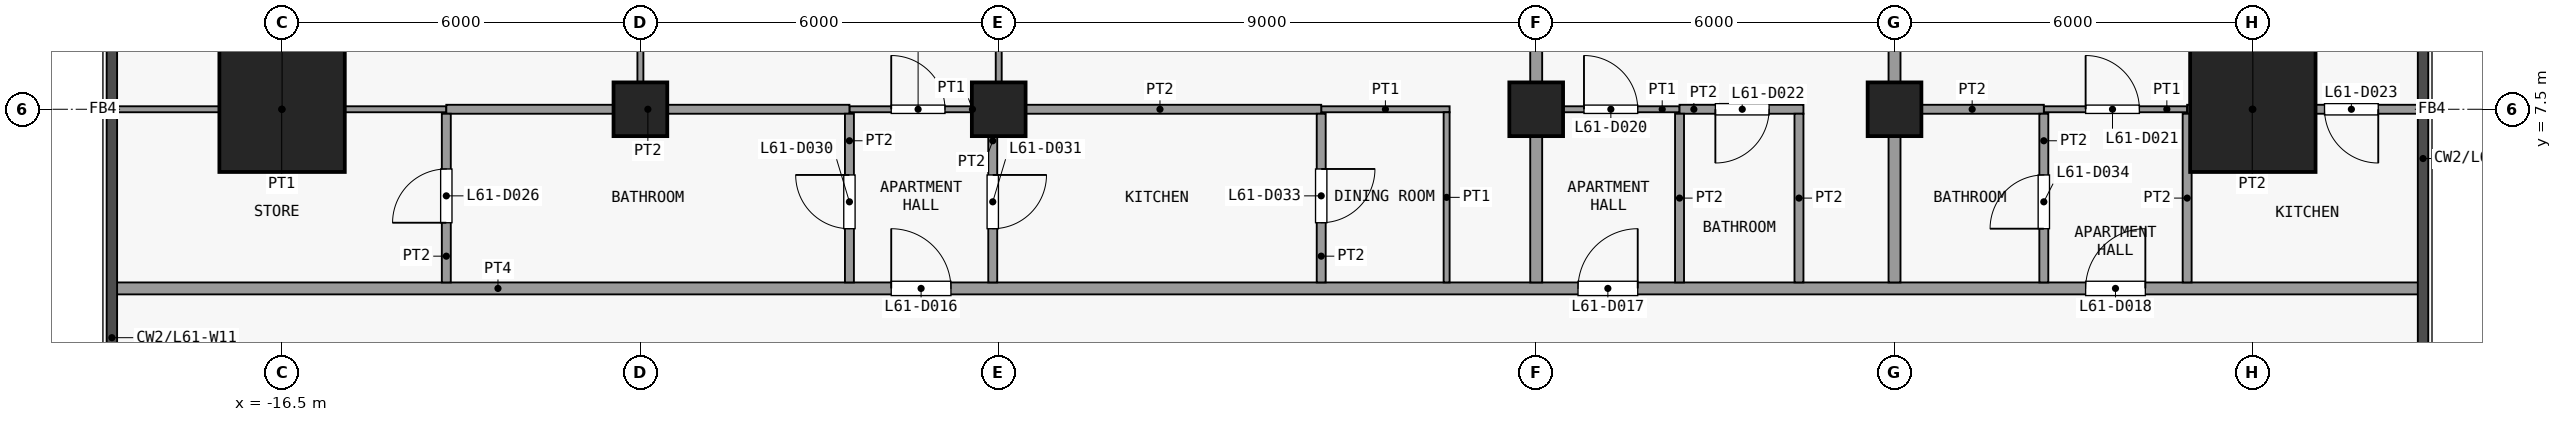
"""IFC4 building model, lengths in metres.
Left out: names, types, materials, properties, quantities, classifications, styles, units other than length and angle.
Written with IfcOpenShell. Run it as: python <this file> out.ifc"""

import sys

from ifc_helpers import new_model, si_unit, direction, frame, frame_2d, origin, origin_2d, place, context, subcontext, project, spatial, rectangle, extrude, element, fill, save


model = new_model("IFC4")
c1 = context("Model", 3, precision=1e-05, world=origin(), true_north=direction((0.0, 1.0)))
c2 = subcontext(c1, "Body", "Model", "MODEL_VIEW")
j1 = project(units=[si_unit("LENGTHUNIT", "METRE"), si_unit("PLANEANGLEUNIT", "RADIAN")], contexts=[c1])
p1 = place(None, origin())
s1 = spatial("IfcSite", under=j1, at=p1, CompositionType="ELEMENT")
p2 = place(p1, origin())
s2 = spatial("IfcBuilding", under=s1, at=p2, CompositionType="ELEMENT")
p3 = place(p2, frame((0.0, 0.0, 241.1)))
s3 = spatial("IfcBuildingStorey", under=s2, at=p3, CompositionType="ELEMENT", Elevation=241.1)
p4 = place(p3, frame((-16.5, 7.5, 0.0), z_axis=(0.0, 0.0, 1.0), x_axis=(1.0, 0.0, 0.0)))
e1 = element("IfcColumn", 1, at=p4, inside=s3, PredefinedType="COLUMN", context=c2, shape_type="SweptSolid", body=[
    extrude(rectangle(XDim=2.1, YDim=2.1, at=origin_2d()), origin(), (0.0, 0.0, 1.0), 3.6),
])
for number, where, z_axis, x_axis in (
    (2, (-10.5, 7.5, 0.0), (0.0, 0.0, 1.0), (1.0, 0.0, 0.0)),
    (3, (-4.5, 7.5, 0.0), (0.0, 0.0, 1.0), (1.0, 0.0, 0.0)),
    (4, (4.5, 7.5, 0.0), (0.0, 0.0, 1.0), (1.0, 0.0, 0.0)),
    (5, (10.5, 7.5, 0.0), (0.0, 0.0, 1.0), (1.0, 0.0, 0.0)),
):
    element("IfcColumn", number, at=place(p3, frame(where, z_axis=z_axis, x_axis=x_axis)), inside=s3, PredefinedType="COLUMN", context=c2, shape_type="SweptSolid", body=[
        extrude(rectangle(XDim=0.9, YDim=0.9, at=origin_2d()), origin(), (0.0, 0.0, 1.0), 3.6),
    ])
p5 = place(p3, frame((16.5, 7.5, 0.0), z_axis=(0.0, 0.0, 1.0), x_axis=(1.0, 0.0, 0.0)))
e6 = element("IfcColumn", 6, at=p5, inside=s3, PredefinedType="COLUMN", context=c2, shape_type="SweptSolid", body=[
    extrude(rectangle(XDim=2.1, YDim=2.1, at=origin_2d()), origin(), (0.0, 0.0, 1.0), 3.6),
])
p6 = place(p3, frame((-19.35, 4.5, 0.0), z_axis=(0.0, 0.0, 1.0), x_axis=(1.0, 0.0, 0.0)))
e7 = element("IfcWall", 7, at=p6, inside=s3, PredefinedType="PARTITIONING", context=c2, shape_type="SweptSolid", body=[
    extrude(rectangle(XDim=38.7, YDim=0.2, at=frame_2d((19.35, 0.0))), origin(), (0.0, 0.0, 1.0), 3.3),
])
p7 = place(p6, frame((13.05, 0.0, 0.0)))
e8 = element("IfcOpeningElement", 8, at=p7, cuts=e7, PredefinedType="OPENING", context=c2, shape_type="SweptSolid", body=[
    extrude(rectangle(XDim=1.0, YDim=2.1, at=frame_2d((0.5, 1.05))), frame((0.0, 0.11, 0.0), z_axis=(0.0, -1.0, 0.0), x_axis=(1.0, 0.0, 0.0)), (0.0, 0.0, 1.0), 0.22),
])
p8 = place(p6, frame((24.55, 0.0, 0.0)))
e9 = element("IfcOpeningElement", 9, at=p8, cuts=e7, PredefinedType="OPENING", context=c2, shape_type="SweptSolid", body=[
    extrude(rectangle(XDim=1.0, YDim=2.1, at=frame_2d((0.5, 1.05))), frame((0.0, 0.11, 0.0), z_axis=(0.0, -1.0, 0.0), x_axis=(1.0, 0.0, 0.0)), (0.0, 0.0, 1.0), 0.22),
])
p9 = place(p6, frame((33.05, 0.0, 0.0)))
e10 = element("IfcOpeningElement", 10, at=p9, cuts=e7, PredefinedType="OPENING", context=c2, shape_type="SweptSolid", body=[
    extrude(rectangle(XDim=1.0, YDim=2.1, at=frame_2d((0.5, 1.05))), frame((0.0, 0.11, 0.0), z_axis=(0.0, -1.0, 0.0), x_axis=(1.0, 0.0, 0.0)), (0.0, 0.0, 1.0), 0.22),
])
p10 = place(p3, frame((-19.262, 7.5, 0.0), z_axis=(0.0, 0.0, 1.0), x_axis=(1.0, 0.0, 0.0)))
e11 = element("IfcWall", 11, at=p10, inside=s3, PredefinedType="PARTITIONING", context=c2, shape_type="SweptSolid", body=[
    extrude(rectangle(XDim=5.512, YDim=0.1, at=frame_2d((2.756, 0.0))), origin(), (0.0, 0.0, 1.0), 3.3),
])
p11 = place(p3, frame((-7.0, 7.5, 0.0), z_axis=(0.0, 0.0, 1.0), x_axis=(1.0, 0.0, 0.0)))
e12 = element("IfcWall", 12, at=p11, inside=s3, PredefinedType="PARTITIONING", context=c2, shape_type="SweptSolid", body=[
    extrude(rectangle(XDim=2.4, YDim=0.1, at=frame_2d((1.2, 0.0))), origin(), (0.0, 0.0, 1.0), 3.3),
])
p12 = place(p11, frame((0.7, 0.0, 0.0)))
e13 = element("IfcOpeningElement", 13, at=p12, cuts=e12, PredefinedType="OPENING", context=c2, shape_type="SweptSolid", body=[
    extrude(rectangle(XDim=0.9, YDim=2.1, at=frame_2d((0.45, 1.05))), frame((0.0, 0.06, 0.0), z_axis=(0.0, -1.0, 0.0), x_axis=(1.0, 0.0, 0.0)), (0.0, 0.0, 1.0), 0.12),
])
p13 = place(p3, frame((0.9, 7.5, 0.0), z_axis=(0.0, 0.0, 1.0), x_axis=(1.0, 0.0, 0.0)))
e14 = element("IfcWall", 14, at=p13, inside=s3, PredefinedType="PARTITIONING", context=c2, shape_type="SweptSolid", body=[
    extrude(rectangle(XDim=2.15, YDim=0.1, at=frame_2d((1.075, 0.0))), origin(), (0.0, 0.0, 1.0), 3.3),
])
p14 = place(p3, frame((4.6, 7.5, 0.0), z_axis=(0.0, 0.0, 1.0), x_axis=(1.0, 0.0, 0.0)))
e15 = element("IfcWall", 15, at=p14, inside=s3, PredefinedType="PARTITIONING", context=c2, shape_type="SweptSolid", body=[
    extrude(rectangle(XDim=2.3, YDim=0.1, at=frame_2d((1.15, 0.0))), origin(), (0.0, 0.0, 1.0), 3.3),
])
p15 = place(p14, frame((0.7, 0.0, 0.0)))
e16 = element("IfcOpeningElement", 16, at=p15, cuts=e15, PredefinedType="OPENING", context=c2, shape_type="SweptSolid", body=[
    extrude(rectangle(XDim=0.9, YDim=2.1, at=frame_2d((0.45, 1.05))), frame((0.0, 0.06, 0.0), z_axis=(0.0, -1.0, 0.0), x_axis=(1.0, 0.0, 0.0)), (0.0, 0.0, 1.0), 0.12),
])
p16 = place(p3, frame((13.0, 7.5, 0.0), z_axis=(0.0, 0.0, 1.0), x_axis=(1.0, 0.0, 0.0)))
e17 = element("IfcWall", 17, at=p16, inside=s3, PredefinedType="PARTITIONING", context=c2, shape_type="SweptSolid", body=[
    extrude(rectangle(XDim=2.4, YDim=0.1, at=frame_2d((1.2, 0.0))), origin(), (0.0, 0.0, 1.0), 3.3),
])
p17 = place(p16, frame((0.7, 0.0, 0.0)))
e18 = element("IfcOpeningElement", 18, at=p17, cuts=e17, PredefinedType="OPENING", context=c2, shape_type="SweptSolid", body=[
    extrude(rectangle(XDim=0.9, YDim=2.1, at=frame_2d((0.45, 1.05))), frame((0.0, 0.06, 0.0), z_axis=(0.0, -1.0, 0.0), x_axis=(1.0, 0.0, 0.0)), (0.0, 0.0, 1.0), 0.12),
])
p18 = place(p3, frame((-13.75, 7.5, 0.0), z_axis=(0.0, 0.0, 1.0), x_axis=(1.0, 0.0, 0.0)))
e19 = element("IfcWall", 19, at=p18, inside=s3, PredefinedType="PARTITIONING", context=c2, shape_type="SweptSolid", body=[
    extrude(rectangle(XDim=6.75, YDim=0.15, at=frame_2d((3.375, 0.0))), origin(), (0.0, 0.0, 1.0), 3.3),
])
p19 = place(p3, frame((-4.5, 7.5, 0.0), z_axis=(0.0, 0.0, 1.0), x_axis=(1.0, 0.0, 0.0)))
e20 = element("IfcWall", 20, at=p19, inside=s3, PredefinedType="PARTITIONING", context=c2, shape_type="SweptSolid", body=[
    extrude(rectangle(XDim=5.4, YDim=0.15, at=frame_2d((2.7, 0.0))), origin(), (0.0, 0.0, 1.0), 3.3),
])
p20 = place(p3, frame((6.9, 7.5, 0.0), z_axis=(0.0, 0.0, 1.0), x_axis=(1.0, 0.0, 0.0)))
e21 = element("IfcWall", 21, at=p20, inside=s3, PredefinedType="PARTITIONING", context=c2, shape_type="SweptSolid", body=[
    extrude(rectangle(XDim=2.075, YDim=0.15, at=frame_2d((1.038, 0.0))), origin(), (0.0, 0.0, 1.0), 3.3),
])
p21 = place(p20, frame((0.6, 0.0, 0.0)))
e22 = element("IfcOpeningElement", 22, at=p21, cuts=e21, PredefinedType="OPENING", context=c2, shape_type="SweptSolid", body=[
    extrude(rectangle(XDim=0.9, YDim=2.1, at=frame_2d((0.45, 1.05))), frame((0.0, 0.085, 0.0), z_axis=(0.0, -1.0, 0.0), x_axis=(1.0, 0.0, 0.0)), (0.0, 0.0, 1.0), 0.17),
])
p22 = place(p3, frame((10.6, 7.5, 0.0), z_axis=(0.0, 0.0, 1.0), x_axis=(1.0, 0.0, 0.0)))
e23 = element("IfcWall", 23, at=p22, inside=s3, PredefinedType="PARTITIONING", context=c2, shape_type="SweptSolid", body=[
    extrude(rectangle(XDim=2.4, YDim=0.15, at=frame_2d((1.2, 0.0))), origin(), (0.0, 0.0, 1.0), 3.3),
])
p23 = place(p3, frame((15.4, 7.5, 0.0), z_axis=(0.0, 0.0, 1.0), x_axis=(1.0, 0.0, 0.0)))
e24 = element("IfcWall", 24, at=p23, inside=s3, PredefinedType="PARTITIONING", context=c2, shape_type="SweptSolid", body=[
    extrude(rectangle(XDim=3.863, YDim=0.15, at=frame_2d((1.931, 0.0))), origin(), (0.0, 0.0, 1.0), 3.3),
])
p24 = place(p23, frame((2.3, 0.0, 0.0)))
e25 = element("IfcOpeningElement", 25, at=p24, cuts=e24, PredefinedType="OPENING", context=c2, shape_type="SweptSolid", body=[
    extrude(rectangle(XDim=0.9, YDim=2.1, at=frame_2d((0.45, 1.05))), frame((0.0, 0.085, 0.0), z_axis=(0.0, -1.0, 0.0), x_axis=(1.0, 0.0, 0.0)), (0.0, 0.0, 1.0), 0.17),
])
p25 = place(p3, frame((-13.75, 4.6, 0.0), z_axis=(0.0, 0.0, 1.0), x_axis=(0.0, 1.0, 0.0)))
e26 = element("IfcWall", 26, at=p25, inside=s3, PredefinedType="PARTITIONING", context=c2, shape_type="SweptSolid", body=[
    extrude(rectangle(XDim=2.825, YDim=0.15, at=frame_2d((1.413, 0.0))), origin(), (0.0, 0.0, 1.0), 3.3),
])
p26 = place(p25, frame((1.0, 0.0, 0.0)))
e27 = element("IfcOpeningElement", 27, at=p26, cuts=e26, PredefinedType="OPENING", context=c2, shape_type="SweptSolid", body=[
    extrude(rectangle(XDim=0.9, YDim=2.1, at=frame_2d((0.45, 1.05))), frame((0.0, 0.085, 0.0), z_axis=(0.0, -1.0, 0.0), x_axis=(1.0, 0.0, 0.0)), (0.0, 0.0, 1.0), 0.17),
])
p27 = place(p3, frame((-10.5, 7.575, 0.0), z_axis=(0.0, 0.0, 1.0), x_axis=(0.0, 1.0, 0.0)))
e28 = element("IfcWall", 28, at=p27, inside=s3, PredefinedType="PARTITIONING", context=c2, shape_type="SweptSolid", body=[
    extrude(rectangle(XDim=8.688, YDim=0.1, at=frame_2d((4.344, 0.0))), origin(), (0.0, 0.0, 1.0), 3.3),
])
p28 = place(p27, frame((6.425, 0.0, 0.0)))
e29 = element("IfcOpeningElement", 29, at=p28, cuts=e28, PredefinedType="OPENING", context=c2, shape_type="SweptSolid", body=[
    extrude(rectangle(XDim=0.9, YDim=2.1, at=frame_2d((0.45, 1.05))), frame((0.0, 0.06, 0.0), z_axis=(0.0, -1.0, 0.0), x_axis=(1.0, 0.0, 0.0)), (0.0, 0.0, 1.0), 0.12),
])
p29 = place(p3, frame((-7.0, 4.6, 0.0), z_axis=(0.0, 0.0, 1.0), x_axis=(0.0, 1.0, 0.0)))
e30 = element("IfcWall", 30, at=p29, inside=s3, PredefinedType="PARTITIONING", context=c2, shape_type="SweptSolid", body=[
    extrude(rectangle(XDim=2.825, YDim=0.15, at=frame_2d((1.413, 0.0))), origin(), (0.0, 0.0, 1.0), 3.3),
])
p30 = place(p29, frame((0.9, 0.0, 0.0)))
e31 = element("IfcOpeningElement", 31, at=p30, cuts=e30, PredefinedType="OPENING", context=c2, shape_type="SweptSolid", body=[
    extrude(rectangle(XDim=0.9, YDim=2.1, at=frame_2d((0.45, 1.05))), frame((0.0, 0.085, 0.0), z_axis=(0.0, -1.0, 0.0), x_axis=(1.0, 0.0, 0.0)), (0.0, 0.0, 1.0), 0.17),
])
p31 = place(p3, frame((-4.6, 4.6, 0.0), z_axis=(0.0, 0.0, 1.0), x_axis=(0.0, 1.0, 0.0)))
e32 = element("IfcWall", 32, at=p31, inside=s3, PredefinedType="PARTITIONING", context=c2, shape_type="SweptSolid", body=[
    extrude(rectangle(XDim=2.825, YDim=0.15, at=frame_2d((1.413, 0.0))), origin(), (0.0, 0.0, 1.0), 3.3),
])
p32 = place(p31, frame((0.9, 0.0, 0.0)))
e33 = element("IfcOpeningElement", 33, at=p32, cuts=e32, PredefinedType="OPENING", context=c2, shape_type="SweptSolid", body=[
    extrude(rectangle(XDim=0.9, YDim=2.1, at=frame_2d((0.45, 1.05))), frame((0.0, 0.085, 0.0), z_axis=(0.0, -1.0, 0.0), x_axis=(1.0, 0.0, 0.0)), (0.0, 0.0, 1.0), 0.17),
])
p33 = place(p3, frame((-4.5, 7.575, 0.0), z_axis=(0.0, 0.0, 1.0), x_axis=(0.0, 1.0, 0.0)))
e34 = element("IfcWall", 34, at=p33, inside=s3, PredefinedType="PARTITIONING", context=c2, shape_type="SweptSolid", body=[
    extrude(rectangle(XDim=8.688, YDim=0.1, at=frame_2d((4.344, 0.0))), origin(), (0.0, 0.0, 1.0), 3.3),
])
p34 = place(p33, frame((6.425, 0.0, 0.0)))
e35 = element("IfcOpeningElement", 35, at=p34, cuts=e34, PredefinedType="OPENING", context=c2, shape_type="SweptSolid", body=[
    extrude(rectangle(XDim=0.9, YDim=2.1, at=frame_2d((0.45, 1.05))), frame((0.0, 0.06, 0.0), z_axis=(0.0, -1.0, 0.0), x_axis=(1.0, 0.0, 0.0)), (0.0, 0.0, 1.0), 0.12),
])
p35 = place(p3, frame((0.9, 4.6, 0.0), z_axis=(0.0, 0.0, 1.0), x_axis=(0.0, 1.0, 0.0)))
e36 = element("IfcWall", 36, at=p35, inside=s3, PredefinedType="PARTITIONING", context=c2, shape_type="SweptSolid", body=[
    extrude(rectangle(XDim=2.825, YDim=0.15, at=frame_2d((1.413, 0.0))), origin(), (0.0, 0.0, 1.0), 3.3),
])
p36 = place(p35, frame((1.0, 0.0, 0.0)))
e37 = element("IfcOpeningElement", 37, at=p36, cuts=e36, PredefinedType="OPENING", context=c2, shape_type="SweptSolid", body=[
    extrude(rectangle(XDim=0.9, YDim=2.1, at=frame_2d((0.45, 1.05))), frame((0.0, 0.085, 0.0), z_axis=(0.0, -1.0, 0.0), x_axis=(1.0, 0.0, 0.0)), (0.0, 0.0, 1.0), 0.17),
])
p37 = place(p3, frame((3.0, 4.6, 0.0), z_axis=(0.0, 0.0, 1.0), x_axis=(0.0, 1.0, 0.0)))
e38 = element("IfcWall", 38, at=p37, inside=s3, PredefinedType="PARTITIONING", context=c2, shape_type="SweptSolid", body=[
    extrude(rectangle(XDim=2.85, YDim=0.1, at=frame_2d((1.425, 0.0))), origin(), (0.0, 0.0, 1.0), 3.3),
])
p38 = place(p3, frame((4.5, 4.6, 0.0), z_axis=(0.0, 0.0, 1.0), x_axis=(0.0, 1.0, 0.0)))
e39 = element("IfcWall", 39, at=p38, inside=s3, PredefinedType="PARTITIONING", context=c2, shape_type="SweptSolid", body=[
    extrude(rectangle(XDim=10.25, YDim=0.2, at=frame_2d((5.125, 0.0))), origin(), (0.0, 0.0, 1.0), 3.3),
])
for number, where, z_axis, x_axis in (
    (40, (6.9, 4.6, 0.0), (0.0, 0.0, 1.0), (0.0, 1.0, 0.0)),
    (41, (8.9, 4.6, 0.0), (0.0, 0.0, 1.0), (0.0, 1.0, 0.0)),
):
    element("IfcWall", number, at=place(p3, frame(where, z_axis=z_axis, x_axis=x_axis)), inside=s3, PredefinedType="PARTITIONING", context=c2, shape_type="SweptSolid", body=[
        extrude(rectangle(XDim=2.825, YDim=0.15, at=frame_2d((1.413, 0.0))), origin(), (0.0, 0.0, 1.0), 3.3),
    ])
p39 = place(p3, frame((10.5, 4.6, 0.0), z_axis=(0.0, 0.0, 1.0), x_axis=(0.0, 1.0, 0.0)))
e42 = element("IfcWall", 42, at=p39, inside=s3, PredefinedType="PARTITIONING", context=c2, shape_type="SweptSolid", body=[
    extrude(rectangle(XDim=10.25, YDim=0.2, at=frame_2d((5.125, 0.0))), origin(), (0.0, 0.0, 1.0), 3.3),
])
p40 = place(p3, frame((13.0, 4.6, 0.0), z_axis=(0.0, 0.0, 1.0), x_axis=(0.0, 1.0, 0.0)))
e43 = element("IfcWall", 43, at=p40, inside=s3, PredefinedType="PARTITIONING", context=c2, shape_type="SweptSolid", body=[
    extrude(rectangle(XDim=2.825, YDim=0.15, at=frame_2d((1.413, 0.0))), origin(), (0.0, 0.0, 1.0), 3.3),
])
p41 = place(p40, frame((0.9, 0.0, 0.0)))
e44 = element("IfcOpeningElement", 44, at=p41, cuts=e43, PredefinedType="OPENING", context=c2, shape_type="SweptSolid", body=[
    extrude(rectangle(XDim=0.9, YDim=2.1, at=frame_2d((0.45, 1.05))), frame((0.0, 0.085, 0.0), z_axis=(0.0, -1.0, 0.0), x_axis=(1.0, 0.0, 0.0)), (0.0, 0.0, 1.0), 0.17),
])
p42 = place(p3, frame((15.4, 4.6, 0.0), z_axis=(0.0, 0.0, 1.0), x_axis=(0.0, 1.0, 0.0)))
e45 = element("IfcWall", 45, at=p42, inside=s3, PredefinedType="PARTITIONING", context=c2, shape_type="SweptSolid", body=[
    extrude(rectangle(XDim=2.825, YDim=0.15, at=frame_2d((1.413, 0.0))), origin(), (0.0, 0.0, 1.0), 3.3),
])
p43 = place(p7, origin())
e46 = element("IfcDoor", 46, at=p43, inside=s3, OperationType="SINGLE_SWING_RIGHT", PredefinedType="DOOR", context=c2, shape_type="SweptSolid", body=[
    extrude(rectangle(XDim=1.0, YDim=2.1, at=frame_2d((0.5, 1.05))), frame((0.0, 0.025, 0.0), z_axis=(0.0, -1.0, 0.0), x_axis=(1.0, 0.0, 0.0)), (0.0, 0.0, 1.0), 0.05),
])
fill(e8, e46)
p44 = place(p8, origin())
e47 = element("IfcDoor", 47, at=p44, inside=s3, OperationType="SINGLE_SWING_LEFT", PredefinedType="DOOR", context=c2, shape_type="SweptSolid", body=[
    extrude(rectangle(XDim=1.0, YDim=2.1, at=frame_2d((0.5, 1.05))), frame((0.0, 0.025, 0.0), z_axis=(0.0, -1.0, 0.0), x_axis=(1.0, 0.0, 0.0)), (0.0, 0.0, 1.0), 0.05),
])
fill(e9, e47)
p45 = place(p9, origin())
e48 = element("IfcDoor", 48, at=p45, inside=s3, OperationType="SINGLE_SWING_LEFT", PredefinedType="DOOR", context=c2, shape_type="SweptSolid", body=[
    extrude(rectangle(XDim=1.0, YDim=2.1, at=frame_2d((0.5, 1.05))), frame((0.0, 0.025, 0.0), z_axis=(0.0, -1.0, 0.0), x_axis=(1.0, 0.0, 0.0)), (0.0, 0.0, 1.0), 0.05),
])
fill(e10, e48)
p46 = place(p12, origin())
e49 = element("IfcDoor", 49, at=p46, inside=s3, OperationType="SINGLE_SWING_RIGHT", PredefinedType="DOOR", context=c2, shape_type="SweptSolid", body=[
    extrude(rectangle(XDim=0.9, YDim=2.1, at=frame_2d((0.45, 1.05))), frame((0.0, 0.025, 0.0), z_axis=(0.0, -1.0, 0.0), x_axis=(1.0, 0.0, 0.0)), (0.0, 0.0, 1.0), 0.05),
])
fill(e13, e49)
p47 = place(p15, origin())
e50 = element("IfcDoor", 50, at=p47, inside=s3, OperationType="SINGLE_SWING_RIGHT", PredefinedType="DOOR", context=c2, shape_type="SweptSolid", body=[
    extrude(rectangle(XDim=0.9, YDim=2.1, at=frame_2d((0.45, 1.05))), frame((0.0, 0.025, 0.0), z_axis=(0.0, -1.0, 0.0), x_axis=(1.0, 0.0, 0.0)), (0.0, 0.0, 1.0), 0.05),
])
fill(e16, e50)
p48 = place(p17, origin())
e51 = element("IfcDoor", 51, at=p48, inside=s3, OperationType="SINGLE_SWING_RIGHT", PredefinedType="DOOR", context=c2, shape_type="SweptSolid", body=[
    extrude(rectangle(XDim=0.9, YDim=2.1, at=frame_2d((0.45, 1.05))), frame((0.0, 0.025, 0.0), z_axis=(0.0, -1.0, 0.0), x_axis=(1.0, 0.0, 0.0)), (0.0, 0.0, 1.0), 0.05),
])
fill(e18, e51)
p49 = place(p21, origin())
e52 = element("IfcDoor", 52, at=p49, inside=s3, OperationType="SINGLE_SWING_LEFT", PredefinedType="DOOR", context=c2, shape_type="SweptSolid", body=[
    extrude(rectangle(XDim=0.9, YDim=2.1, at=frame_2d((0.45, 1.05))), frame((0.0, 0.025, 0.0), z_axis=(0.0, -1.0, 0.0), x_axis=(1.0, 0.0, 0.0)), (0.0, 0.0, 1.0), 0.05),
])
fill(e22, e52)
p50 = place(p24, origin())
e53 = element("IfcDoor", 53, at=p50, inside=s3, OperationType="SINGLE_SWING_RIGHT", PredefinedType="DOOR", context=c2, shape_type="SweptSolid", body=[
    extrude(rectangle(XDim=0.9, YDim=2.1, at=frame_2d((0.45, 1.05))), frame((0.0, 0.025, 0.0), z_axis=(0.0, -1.0, 0.0), x_axis=(1.0, 0.0, 0.0)), (0.0, 0.0, 1.0), 0.05),
])
fill(e25, e53)
p51 = place(p26, origin())
e54 = element("IfcDoor", 54, at=p51, inside=s3, OperationType="SINGLE_SWING_RIGHT", PredefinedType="DOOR", context=c2, shape_type="SweptSolid", body=[
    extrude(rectangle(XDim=0.9, YDim=2.1, at=frame_2d((0.45, 1.05))), frame((0.0, 0.025, 0.0), z_axis=(0.0, -1.0, 0.0), x_axis=(1.0, 0.0, 0.0)), (0.0, 0.0, 1.0), 0.05),
])
fill(e27, e54)
p52 = place(p30, origin())
e55 = element("IfcDoor", 55, at=p52, inside=s3, OperationType="SINGLE_SWING_LEFT", PredefinedType="DOOR", context=c2, shape_type="SweptSolid", body=[
    extrude(rectangle(XDim=0.9, YDim=2.1, at=frame_2d((0.45, 1.05))), frame((0.0, 0.025, 0.0), z_axis=(0.0, -1.0, 0.0), x_axis=(1.0, 0.0, 0.0)), (0.0, 0.0, 1.0), 0.05),
])
fill(e31, e55)
p53 = place(p32, origin())
e56 = element("IfcDoor", 56, at=p53, inside=s3, OperationType="SINGLE_SWING_RIGHT", PredefinedType="DOOR", context=c2, shape_type="SweptSolid", body=[
    extrude(rectangle(XDim=0.9, YDim=2.1, at=frame_2d((0.45, 1.05))), frame((0.0, 0.025, 0.0), z_axis=(0.0, -1.0, 0.0), x_axis=(1.0, 0.0, 0.0)), (0.0, 0.0, 1.0), 0.05),
])
fill(e33, e56)
p54 = place(p36, origin())
e57 = element("IfcDoor", 57, at=p54, inside=s3, OperationType="SINGLE_SWING_RIGHT", PredefinedType="DOOR", context=c2, shape_type="SweptSolid", body=[
    extrude(rectangle(XDim=0.9, YDim=2.1, at=frame_2d((0.45, 1.05))), frame((0.0, 0.025, 0.0), z_axis=(0.0, -1.0, 0.0), x_axis=(1.0, 0.0, 0.0)), (0.0, 0.0, 1.0), 0.05),
])
fill(e37, e57)
p55 = place(p41, origin())
e58 = element("IfcDoor", 58, at=p55, inside=s3, OperationType="SINGLE_SWING_RIGHT", PredefinedType="DOOR", context=c2, shape_type="SweptSolid", body=[
    extrude(rectangle(XDim=0.9, YDim=2.1, at=frame_2d((0.45, 1.05))), frame((0.0, 0.025, 0.0), z_axis=(0.0, -1.0, 0.0), x_axis=(1.0, 0.0, 0.0)), (0.0, 0.0, 1.0), 0.05),
])
fill(e44, e58)
save(model, sys.argv[1])
